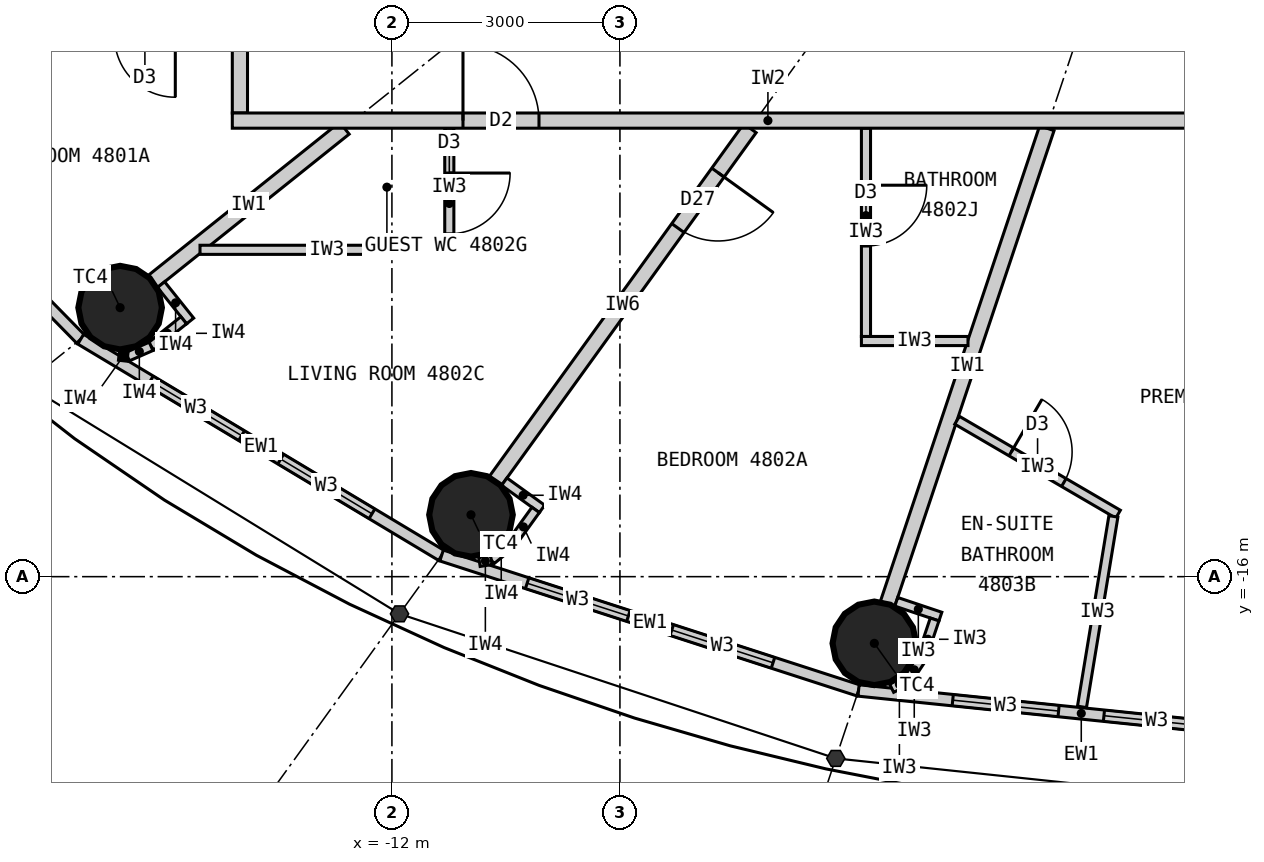
"""IFC4 building model, lengths in metres.
Left out: names, types, materials, properties, quantities, classifications, styles, units other than length and angle.
Written with IfcOpenShell. Run it as: python <this file> out.ifc"""

import sys

from ifc_helpers import new_model, si_unit, direction, frame, frame_2d, origin, origin_2d, place, context, subcontext, project, spatial, rectangle, circle, extrude, element, fill, save


model = new_model("IFC4")
c1 = context("Model", 3, precision=1e-05, world=origin(), true_north=direction((0.0, 1.0)))
c2 = subcontext(c1, "Body", "Model", "MODEL_VIEW")
j1 = project(units=[si_unit("LENGTHUNIT", "METRE"), si_unit("PLANEANGLEUNIT", "RADIAN")], contexts=[c1])
p1 = place(None, origin())
s1 = spatial("IfcSite", under=j1, at=p1, CompositionType="ELEMENT")
p2 = place(p1, origin())
s2 = spatial("IfcBuilding", under=s1, at=p2, CompositionType="ELEMENT")
p3 = place(p2, frame((0.0, 0.0, 179.7)))
s3 = spatial("IfcBuildingStorey", under=s2, at=p3, CompositionType="ELEMENT", Elevation=179.7)
for number, where, z_axis, x_axis in (
    (1, (-15.576, -12.461, 0.0), (0.0, 0.0, 1.0), (1.0, 0.0, 0.0)),
    (2, (-10.96, -15.186, 0.0), (0.0, 0.0, 1.0), (1.0, 0.0, 0.0)),
    (3, (-5.653, -16.877, 0.0), (0.0, 0.0, 1.0), (1.0, 0.0, 0.0)),
):
    element("IfcColumn", number, at=place(p3, frame(where, z_axis=z_axis, x_axis=x_axis)), inside=s3, PredefinedType="COLUMN", context=c2, shape_type="SweptSolid", body=[
        extrude(circle(Radius=0.55, at=origin_2d()), origin(), (0.0, 0.0, 1.0), 3.3),
    ])
p4 = place(p3, frame((-19.772, -9.132, 0.0), z_axis=(0.0, 0.0, 1.0), x_axis=(0.700727467776, -0.71342905457, 0.0)))
e4 = element("IfcWall", 4, at=p4, inside=s3, PredefinedType="ELEMENTEDWALL", context=c2, shape_type="SweptSolid", body=[
    extrude(rectangle(XDim=5.247, YDim=0.15, at=frame_2d((2.624, 0.0))), origin(), (0.0, 0.0, 1.0), 3.12),
])
p5 = place(p4, frame((0.924, 0.0, 0.9)))
e5 = element("IfcOpeningElement", 5, at=p5, cuts=e4, PredefinedType="OPENING", context=c2, shape_type="SweptSolid", body=[
    extrude(rectangle(XDim=1.4, YDim=1.9, at=frame_2d((0.7, 0.95))), frame((0.0, 0.085, 0.0), z_axis=(0.0, -1.0, 0.0), x_axis=(1.0, 0.0, 0.0)), (0.0, 0.0, 1.0), 0.17),
])
p6 = place(p4, frame((2.924, 0.0, 0.9)))
e6 = element("IfcOpeningElement", 6, at=p6, cuts=e4, PredefinedType="OPENING", context=c2, shape_type="SweptSolid", body=[
    extrude(rectangle(XDim=1.4, YDim=1.9, at=frame_2d((0.7, 0.95))), frame((0.0, 0.085, 0.0), z_axis=(0.0, -1.0, 0.0), x_axis=(1.0, 0.0, 0.0)), (0.0, 0.0, 1.0), 0.17),
])
p7 = place(p3, frame((-16.095, -12.876, 0.0), z_axis=(0.0, 0.0, 1.0), x_axis=(0.857695199231, -0.514158482587, 0.0)))
e7 = element("IfcWall", 7, at=p7, inside=s3, PredefinedType="ELEMENTEDWALL", context=c2, shape_type="SweptSolid", body=[
    extrude(rectangle(XDim=5.536, YDim=0.15, at=frame_2d((2.768, 0.0))), origin(), (0.0, 0.0, 1.0), 3.12),
])
p8 = place(p7, frame((1.068, 0.0, 0.9)))
e8 = element("IfcOpeningElement", 8, at=p8, cuts=e7, PredefinedType="OPENING", context=c2, shape_type="SweptSolid", body=[
    extrude(rectangle(XDim=1.4, YDim=1.9, at=frame_2d((0.7, 0.95))), frame((0.0, 0.085, 0.0), z_axis=(0.0, -1.0, 0.0), x_axis=(1.0, 0.0, 0.0)), (0.0, 0.0, 1.0), 0.17),
])
p9 = place(p7, frame((3.068, 0.0, 0.9)))
e9 = element("IfcOpeningElement", 9, at=p9, cuts=e7, PredefinedType="OPENING", context=c2, shape_type="SweptSolid", body=[
    extrude(rectangle(XDim=1.4, YDim=1.9, at=frame_2d((0.7, 0.95))), frame((0.0, 0.085, 0.0), z_axis=(0.0, -1.0, 0.0), x_axis=(1.0, 0.0, 0.0)), (0.0, 0.0, 1.0), 0.17),
])
p10 = place(p3, frame((-11.346, -15.722, 0.0), z_axis=(0.0, 0.0, 1.0), x_axis=(0.951432482129, -0.307857486429, 0.0)))
e10 = element("IfcWall", 10, at=p10, inside=s3, PredefinedType="ELEMENTEDWALL", context=c2, shape_type="SweptSolid", body=[
    extrude(rectangle(XDim=5.766, YDim=0.15, at=frame_2d((2.883, 0.0))), origin(), (0.0, 0.0, 1.0), 3.12),
])
p11 = place(p10, frame((1.183, 0.0, 0.9)))
e11 = element("IfcOpeningElement", 11, at=p11, cuts=e10, PredefinedType="OPENING", context=c2, shape_type="SweptSolid", body=[
    extrude(rectangle(XDim=1.4, YDim=1.9, at=frame_2d((0.7, 0.95))), frame((0.0, 0.085, 0.0), z_axis=(0.0, -1.0, 0.0), x_axis=(1.0, 0.0, 0.0)), (0.0, 0.0, 1.0), 0.17),
])
p12 = place(p10, frame((3.183, 0.0, 0.9)))
e12 = element("IfcOpeningElement", 12, at=p12, cuts=e10, PredefinedType="OPENING", context=c2, shape_type="SweptSolid", body=[
    extrude(rectangle(XDim=1.4, YDim=1.9, at=frame_2d((0.7, 0.95))), frame((0.0, 0.085, 0.0), z_axis=(0.0, -1.0, 0.0), x_axis=(1.0, 0.0, 0.0)), (0.0, 0.0, 1.0), 0.17),
])
p13 = place(p3, frame((-5.86, -17.497, 0.0), z_axis=(0.0, 0.0, 1.0), x_axis=(0.994751738032, -0.102318032045, 0.0)))
e13 = element("IfcWall", 13, at=p13, inside=s3, PredefinedType="ELEMENTEDWALL", context=c2, shape_type="SweptSolid", body=[
    extrude(rectangle(XDim=5.891, YDim=0.15, at=frame_2d((2.946, 0.0))), origin(), (0.0, 0.0, 1.0), 3.12),
])
p14 = place(p13, frame((1.246, 0.0, 0.9)))
e14 = element("IfcOpeningElement", 14, at=p14, cuts=e13, PredefinedType="OPENING", context=c2, shape_type="SweptSolid", body=[
    extrude(rectangle(XDim=1.4, YDim=1.9, at=frame_2d((0.7, 0.95))), frame((0.0, 0.085, 0.0), z_axis=(0.0, -1.0, 0.0), x_axis=(1.0, 0.0, 0.0)), (0.0, 0.0, 1.0), 0.17),
])
p15 = place(p13, frame((3.246, 0.0, 0.9)))
e15 = element("IfcOpeningElement", 15, at=p15, cuts=e13, PredefinedType="OPENING", context=c2, shape_type="SweptSolid", body=[
    extrude(rectangle(XDim=1.4, YDim=1.9, at=frame_2d((0.7, 0.95))), frame((0.0, 0.085, 0.0), z_axis=(0.0, -1.0, 0.0), x_axis=(1.0, 0.0, 0.0)), (0.0, 0.0, 1.0), 0.17),
])
p16 = place(p3, frame((-14.0, 9.9, 0.0), z_axis=(0.0, 0.0, 1.0), x_axis=(0.0, -1.0, 0.0)))
e16 = element("IfcWall", 16, at=p16, inside=s3, PredefinedType="PARTITIONING", context=c2, shape_type="SweptSolid", body=[
    extrude(rectangle(XDim=19.8, YDim=0.2, at=frame_2d((9.9, 0.0))), origin(), (0.0, 0.0, 1.0), 3.12),
])
p17 = place(p16, frame((13.853, 0.0, 0.0)))
e17 = element("IfcOpeningElement", 17, at=p17, cuts=e16, PredefinedType="OPENING", context=c2, shape_type="SweptSolid", body=[
    extrude(rectangle(XDim=1.0, YDim=2.2, at=frame_2d((0.5, 1.1))), frame((0.0, 0.11, 0.0), z_axis=(0.0, -1.0, 0.0), x_axis=(1.0, 0.0, 0.0)), (0.0, 0.0, 1.0), 0.22),
])
p18 = place(p16, frame((1.1, 0.0, 0.0)))
e18 = element("IfcOpeningElement", 18, at=p18, cuts=e16, PredefinedType="OPENING", context=c2, shape_type="SweptSolid", body=[
    extrude(rectangle(XDim=1.0, YDim=2.2, at=frame_2d((0.5, 1.1))), frame((0.0, 0.11, 0.0), z_axis=(0.0, -1.0, 0.0), x_axis=(1.0, 0.0, 0.0)), (0.0, 0.0, 1.0), 0.22),
])
p19 = place(p16, frame((3.688, 0.0, 0.0)))
e19 = element("IfcOpeningElement", 19, at=p19, cuts=e16, PredefinedType="OPENING", context=c2, shape_type="SweptSolid", body=[
    extrude(rectangle(XDim=1.0, YDim=2.2, at=frame_2d((0.5, 1.1))), frame((0.0, 0.11, 0.0), z_axis=(0.0, -1.0, 0.0), x_axis=(1.0, 0.0, 0.0)), (0.0, 0.0, 1.0), 0.22),
])
p20 = place(p16, frame((8.719, 0.0, 0.0)))
e20 = element("IfcOpeningElement", 20, at=p20, cuts=e16, PredefinedType="OPENING", context=c2, shape_type="SweptSolid", body=[
    extrude(rectangle(XDim=1.0, YDim=2.2, at=frame_2d((0.5, 1.1))), frame((0.0, 0.11, 0.0), z_axis=(0.0, -1.0, 0.0), x_axis=(1.0, 0.0, 0.0)), (0.0, 0.0, 1.0), 0.22),
])
p21 = place(p3, frame((-12.625, -10.1, 0.0), z_axis=(0.0, 0.0, 1.0), x_axis=(-0.780876185034, -0.624685827954, 0.0)))
e21 = element("IfcWall", 21, at=p21, inside=s3, PredefinedType="PARTITIONING", context=c2, shape_type="SweptSolid", body=[
    extrude(rectangle(XDim=3.229, YDim=0.2, at=frame_2d((1.615, 0.0))), origin(), (0.0, 0.0, 1.0), 2.27),
])
p22 = place(p3, frame((-7.289, -10.1, 0.0), z_axis=(0.0, 0.0, 1.0), x_axis=(-0.585222595178, -0.810872686735, 0.0)))
e22 = element("IfcWall", 22, at=p22, inside=s3, PredefinedType="PARTITIONING", context=c2, shape_type="SweptSolid", body=[
    extrude(rectangle(XDim=5.722, YDim=0.2, at=frame_2d((2.861, 0.0))), origin(), (0.0, 0.0, 1.0), 2.27),
])
p23 = place(p22, frame((0.72, 0.0, 0.0)))
e23 = element("IfcOpeningElement", 23, at=p23, cuts=e22, PredefinedType="OPENING", context=c2, shape_type="SweptSolid", body=[
    extrude(rectangle(XDim=0.9, YDim=2.1, at=frame_2d((0.45, 1.05))), frame((0.0, 0.11, 0.0), z_axis=(0.0, -1.0, 0.0), x_axis=(1.0, 0.0, 0.0)), (0.0, 0.0, 1.0), 0.22),
])
p24 = place(p3, frame((-3.383, -10.1, 0.0), z_axis=(0.0, 0.0, 1.0), x_axis=(-0.317615120474, -0.948219718866, 0.0)))
e24 = element("IfcWall", 24, at=p24, inside=s3, PredefinedType="PARTITIONING", context=c2, shape_type="SweptSolid", body=[
    extrude(rectangle(XDim=6.597, YDim=0.2, at=frame_2d((3.299, 0.0))), origin(), (0.0, 0.0, 1.0), 2.27),
])
p25 = place(p3, frame((-14.525, -11.7, 0.0), z_axis=(0.0, 0.0, 1.0), x_axis=(1.0, 0.0, 0.0)))
e25 = element("IfcWall", 25, at=p25, inside=s3, PredefinedType="PARTITIONING", context=c2, shape_type="SweptSolid", body=[
    extrude(rectangle(XDim=3.34, YDim=0.12, at=frame_2d((1.67, 0.0))), origin(), (0.0, 0.0, 1.0), 3.12),
])
p26 = place(p3, frame((-11.245, -10.1, 0.0), z_axis=(0.0, 0.0, 1.0), x_axis=(0.0, -1.0, 0.0)))
e26 = element("IfcWall", 26, at=p26, inside=s3, PredefinedType="PARTITIONING", context=c2, shape_type="SweptSolid", body=[
    extrude(rectangle(XDim=1.54, YDim=0.12, at=frame_2d((0.77, 0.0))), origin(), (0.0, 0.0, 1.0), 3.12),
])
p27 = place(p26, frame((0.59, 0.0, 0.0)))
e27 = element("IfcOpeningElement", 27, at=p27, cuts=e26, PredefinedType="OPENING", context=c2, shape_type="SweptSolid", body=[
    extrude(rectangle(XDim=0.8, YDim=2.1, at=frame_2d((0.4, 1.05))), frame((0.0, 0.07, 0.0), z_axis=(0.0, -1.0, 0.0), x_axis=(1.0, 0.0, 0.0)), (0.0, 0.0, 1.0), 0.14),
])
p28 = place(p3, frame((-4.421, -12.9, 0.0), z_axis=(0.0, 0.0, 1.0), x_axis=(-1.0, 0.0, 0.0)))
e28 = element("IfcWall", 28, at=p28, inside=s3, PredefinedType="PARTITIONING", context=c2, shape_type="SweptSolid", body=[
    extrude(rectangle(XDim=1.402, YDim=0.12, at=frame_2d((0.701, 0.0))), origin(), (0.0, 0.0, 1.0), 3.12),
])
p29 = place(p3, frame((-5.763, -10.1, 0.0), z_axis=(0.0, 0.0, 1.0), x_axis=(0.0, -1.0, 0.0)))
e29 = element("IfcWall", 29, at=p29, inside=s3, PredefinedType="PARTITIONING", context=c2, shape_type="SweptSolid", body=[
    extrude(rectangle(XDim=2.74, YDim=0.12, at=frame_2d((1.37, 0.0))), origin(), (0.0, 0.0, 1.0), 3.12),
])
p30 = place(p29, frame((0.75, 0.0, 0.0)))
e30 = element("IfcOpeningElement", 30, at=p30, cuts=e29, PredefinedType="OPENING", context=c2, shape_type="SweptSolid", body=[
    extrude(rectangle(XDim=0.8, YDim=2.1, at=frame_2d((0.4, 1.05))), frame((0.0, 0.07, 0.0), z_axis=(0.0, -1.0, 0.0), x_axis=(1.0, 0.0, 0.0)), (0.0, 0.0, 1.0), 0.14),
])
p31 = place(p3, frame((-4.564, -13.942, 0.0), z_axis=(0.0, 0.0, 1.0), x_axis=(0.863717519451, -0.503976236139, 0.0)))
e31 = element("IfcWall", 31, at=p31, inside=s3, PredefinedType="PARTITIONING", context=c2, shape_type="SweptSolid", body=[
    extrude(rectangle(XDim=2.453, YDim=0.12, at=frame_2d((1.226, 0.0))), origin(), (0.0, 0.0, 1.0), 3.12),
])
p32 = place(p31, frame((0.826, 0.0, 0.0)))
e32 = element("IfcOpeningElement", 32, at=p32, cuts=e31, PredefinedType="OPENING", context=c2, shape_type="SweptSolid", body=[
    extrude(rectangle(XDim=0.8, YDim=2.1, at=frame_2d((0.4, 1.05))), frame((0.0, 0.07, 0.0), z_axis=(0.0, -1.0, 0.0), x_axis=(1.0, 0.0, 0.0)), (0.0, 0.0, 1.0), 0.14),
])
p33 = place(p3, frame((-2.508, -15.207, 0.0), z_axis=(0.0, 0.0, 1.0), x_axis=(-0.162637365963, -0.986685911115, 0.0)))
e33 = element("IfcWall", 33, at=p33, inside=s3, PredefinedType="PARTITIONING", context=c2, shape_type="SweptSolid", body=[
    extrude(rectangle(XDim=2.54, YDim=0.12, at=frame_2d((1.27, 0.0))), origin(), (0.0, 0.0, 1.0), 3.12),
])
p34 = place(p3, frame((-5.364, -16.331, 0.0), z_axis=(0.0, 0.0, 1.0), x_axis=(0.948283770087, -0.317423835572, 0.0)))
e34 = element("IfcWall", 34, at=p34, inside=s3, PredefinedType="PARTITIONING", context=c2, shape_type="SweptSolid", body=[
    extrude(rectangle(XDim=0.612, YDim=0.12, at=frame_2d((0.306, 0.0))), origin(), (0.0, 0.0, 1.0), 3.12),
])
p35 = place(p3, frame((-4.86, -16.563, 0.0), z_axis=(0.0, 0.0, 1.0), x_axis=(-0.317825321803, -0.948149284038, 0.0)))
e35 = element("IfcWall", 35, at=p35, inside=s3, PredefinedType="PARTITIONING", context=c2, shape_type="SweptSolid", body=[
    extrude(rectangle(XDim=0.55, YDim=0.12, at=frame_2d((0.275, 0.0))), origin(), (0.0, 0.0, 1.0), 3.12),
])
p36 = place(p3, frame((-5.034, -17.084, 0.0), z_axis=(0.0, 0.0, 1.0), x_axis=(-0.552362205726, -0.833604218851, 0.0)))
e36 = element("IfcWall", 36, at=p36, inside=s3, PredefinedType="PARTITIONING", context=c2, shape_type="SweptSolid", body=[
    extrude(rectangle(XDim=0.338, YDim=0.12, at=frame_2d((0.169, 0.0))), origin(), (0.0, 0.0, 1.0), 3.12),
])
p37 = place(p3, frame((-5.221, -17.366, 0.0), z_axis=(0.0, 0.0, 1.0), x_axis=(-0.895067896179, -0.445929883759, 0.0)))
e37 = element("IfcWall", 37, at=p37, inside=s3, PredefinedType="PARTITIONING", context=c2, shape_type="SweptSolid", body=[
    extrude(rectangle(XDim=0.228, YDim=0.12, at=frame_2d((0.114, 0.0))), origin(), (0.0, 0.0, 1.0), 3.12),
])
p38 = place(p3, frame((-0.006, -10.0, 0.0), z_axis=(0.0, 0.0, 1.0), x_axis=(-1.0, 0.0, 0.0)))
e38 = element("IfcWall", 38, at=p38, inside=s3, PredefinedType="PARTITIONING", context=c2, shape_type="SweptSolid", body=[
    extrude(rectangle(XDim=14.094, YDim=0.2, at=frame_2d((7.047, 0.0))), origin(), (0.0, 0.0, 1.0), 3.12),
])
p39 = place(p38, frame((10.059, 0.0, 0.0)))
e39 = element("IfcOpeningElement", 39, at=p39, cuts=e38, PredefinedType="OPENING", context=c2, shape_type="SweptSolid", body=[
    extrude(rectangle(XDim=1.0, YDim=2.2, at=frame_2d((0.5, 1.1))), frame((0.0, 0.11, 0.0), z_axis=(0.0, -1.0, 0.0), x_axis=(1.0, 0.0, 0.0)), (0.0, 0.0, 1.0), 0.22),
])
p40 = place(p3, frame((-15.037, -12.158, 0.0), z_axis=(0.0, 0.0, 1.0), x_axis=(0.624840920722, -0.78075208856, 0.0)))
e40 = element("IfcWall", 40, at=p40, inside=s3, PredefinedType="PARTITIONING", context=c2, shape_type="SweptSolid", body=[
    extrude(rectangle(XDim=0.612, YDim=0.12, at=frame_2d((0.306, 0.0))), origin(), (0.0, 0.0, 1.0), 3.12),
])
p41 = place(p3, frame((-14.739, -12.627, 0.0), z_axis=(0.0, 0.0, 1.0), x_axis=(-0.780912119987, -0.624640905527, 0.0)))
e41 = element("IfcWall", 41, at=p41, inside=s3, PredefinedType="PARTITIONING", context=c2, shape_type="SweptSolid", body=[
    extrude(rectangle(XDim=0.55, YDim=0.12, at=frame_2d((0.275, 0.0))), origin(), (0.0, 0.0, 1.0), 3.12),
])
p42 = place(p3, frame((-15.169, -12.97, 0.0), z_axis=(0.0, 0.0, 1.0), x_axis=(-0.915974725257, -0.401235968838, 0.0)))
e42 = element("IfcWall", 42, at=p42, inside=s3, PredefinedType="PARTITIONING", context=c2, shape_type="SweptSolid", body=[
    extrude(rectangle(XDim=0.338, YDim=0.12, at=frame_2d((0.169, 0.0))), origin(), (0.0, 0.0, 1.0), 3.12),
])
p43 = place(p3, frame((-15.478, -13.106, 0.0), z_axis=(0.0, 0.0, 1.0), x_axis=(-0.993778813557, 0.111371763588, 0.0)))
e43 = element("IfcWall", 43, at=p43, inside=s3, PredefinedType="PARTITIONING", context=c2, shape_type="SweptSolid", body=[
    extrude(rectangle(XDim=0.114, YDim=0.12, at=frame_2d((0.057, 0.0))), origin(), (0.0, 0.0, 1.0), 3.12),
])
p44 = place(p3, frame((-10.522, -14.75, 0.0), z_axis=(0.0, 0.0, 1.0), x_axis=(0.811057588427, -0.584966313777, 0.0)))
e44 = element("IfcWall", 44, at=p44, inside=s3, PredefinedType="PARTITIONING", context=c2, shape_type="SweptSolid", body=[
    extrude(rectangle(XDim=0.612, YDim=0.12, at=frame_2d((0.306, 0.0))), origin(), (0.0, 0.0, 1.0), 3.12),
])
p45 = place(p3, frame((-10.109, -15.122, 0.0), z_axis=(0.0, 0.0, 1.0), x_axis=(-0.585344718358, -0.810784534072, 0.0)))
e45 = element("IfcWall", 45, at=p45, inside=s3, PredefinedType="PARTITIONING", context=c2, shape_type="SweptSolid", body=[
    extrude(rectangle(XDim=0.55, YDim=0.12, at=frame_2d((0.275, 0.0))), origin(), (0.0, 0.0, 1.0), 3.12),
])
p46 = place(p3, frame((-10.431, -15.568, 0.0), z_axis=(0.0, 0.0, 1.0), x_axis=(-0.77505137267, -0.631898227345, 0.0)))
e46 = element("IfcWall", 46, at=p46, inside=s3, PredefinedType="PARTITIONING", context=c2, shape_type="SweptSolid", body=[
    extrude(rectangle(XDim=0.338, YDim=0.12, at=frame_2d((0.169, 0.0))), origin(), (0.0, 0.0, 1.0), 3.12),
])
p47 = place(p3, frame((-10.693, -15.781, 0.0), z_axis=(0.0, 0.0, 1.0), x_axis=(-0.987256785332, -0.159135287777, 0.0)))
e47 = element("IfcWall", 47, at=p47, inside=s3, PredefinedType="PARTITIONING", context=c2, shape_type="SweptSolid", body=[
    extrude(rectangle(XDim=0.158, YDim=0.12, at=frame_2d((0.079, 0.0))), origin(), (0.0, 0.0, 1.0), 3.12),
])
p48 = place(p8, origin())
e48 = element("IfcWindow", 48, at=p48, inside=s3, PartitioningType="SINGLE_PANEL", PredefinedType="WINDOW", context=c2, shape_type="SweptSolid", body=[
    extrude(rectangle(XDim=1.4, YDim=1.9, at=frame_2d((0.7, 0.95))), frame((0.0, 0.03, 0.0), z_axis=(0.0, -1.0, 0.0), x_axis=(1.0, 0.0, 0.0)), (0.0, 0.0, 1.0), 0.06),
])
fill(e8, e48)
p49 = place(p9, origin())
e49 = element("IfcWindow", 49, at=p49, inside=s3, PartitioningType="SINGLE_PANEL", PredefinedType="WINDOW", context=c2, shape_type="SweptSolid", body=[
    extrude(rectangle(XDim=1.4, YDim=1.9, at=frame_2d((0.7, 0.95))), frame((0.0, 0.03, 0.0), z_axis=(0.0, -1.0, 0.0), x_axis=(1.0, 0.0, 0.0)), (0.0, 0.0, 1.0), 0.06),
])
fill(e9, e49)
p50 = place(p11, origin())
e50 = element("IfcWindow", 50, at=p50, inside=s3, PartitioningType="SINGLE_PANEL", PredefinedType="WINDOW", context=c2, shape_type="SweptSolid", body=[
    extrude(rectangle(XDim=1.4, YDim=1.9, at=frame_2d((0.7, 0.95))), frame((0.0, 0.03, 0.0), z_axis=(0.0, -1.0, 0.0), x_axis=(1.0, 0.0, 0.0)), (0.0, 0.0, 1.0), 0.06),
])
fill(e11, e50)
p51 = place(p12, origin())
e51 = element("IfcWindow", 51, at=p51, inside=s3, PartitioningType="SINGLE_PANEL", PredefinedType="WINDOW", context=c2, shape_type="SweptSolid", body=[
    extrude(rectangle(XDim=1.4, YDim=1.9, at=frame_2d((0.7, 0.95))), frame((0.0, 0.03, 0.0), z_axis=(0.0, -1.0, 0.0), x_axis=(1.0, 0.0, 0.0)), (0.0, 0.0, 1.0), 0.06),
])
fill(e12, e51)
p52 = place(p14, origin())
e52 = element("IfcWindow", 52, at=p52, inside=s3, PartitioningType="SINGLE_PANEL", PredefinedType="WINDOW", context=c2, shape_type="SweptSolid", body=[
    extrude(rectangle(XDim=1.4, YDim=1.9, at=frame_2d((0.7, 0.95))), frame((0.0, 0.03, 0.0), z_axis=(0.0, -1.0, 0.0), x_axis=(1.0, 0.0, 0.0)), (0.0, 0.0, 1.0), 0.06),
])
fill(e14, e52)
p53 = place(p15, origin())
e53 = element("IfcWindow", 53, at=p53, inside=s3, PartitioningType="SINGLE_PANEL", PredefinedType="WINDOW", context=c2, shape_type="SweptSolid", body=[
    extrude(rectangle(XDim=1.4, YDim=1.9, at=frame_2d((0.7, 0.95))), frame((0.0, 0.03, 0.0), z_axis=(0.0, -1.0, 0.0), x_axis=(1.0, 0.0, 0.0)), (0.0, 0.0, 1.0), 0.06),
])
fill(e15, e53)
p54 = place(p27, origin())
e54 = element("IfcDoor", 54, at=p54, inside=s3, OperationType="SINGLE_SWING_LEFT", PredefinedType="DOOR", context=c2, shape_type="SweptSolid", body=[
    extrude(rectangle(XDim=0.8, YDim=2.1, at=frame_2d((0.4, 1.05))), frame((0.0, 0.025, 0.0), z_axis=(0.0, -1.0, 0.0), x_axis=(1.0, 0.0, 0.0)), (0.0, 0.0, 1.0), 0.05),
])
fill(e27, e54)
p55 = place(p39, origin())
e55 = element("IfcDoor", 55, at=p55, inside=s3, OperationType="SINGLE_SWING_RIGHT", PredefinedType="DOOR", context=c2, shape_type="SweptSolid", body=[
    extrude(rectangle(XDim=1.0, YDim=2.2, at=frame_2d((0.5, 1.1))), frame((0.0, 0.025, 0.0), z_axis=(0.0, -1.0, 0.0), x_axis=(1.0, 0.0, 0.0)), (0.0, 0.0, 1.0), 0.05),
])
fill(e39, e55)
p56 = place(p30, origin())
e56 = element("IfcDoor", 56, at=p56, inside=s3, OperationType="SINGLE_SWING_LEFT", PredefinedType="DOOR", context=c2, shape_type="SweptSolid", body=[
    extrude(rectangle(XDim=0.8, YDim=2.1, at=frame_2d((0.4, 1.05))), frame((0.0, 0.025, 0.0), z_axis=(0.0, -1.0, 0.0), x_axis=(1.0, 0.0, 0.0)), (0.0, 0.0, 1.0), 0.05),
])
fill(e30, e56)
p57 = place(p23, origin())
e57 = element("IfcDoor", 57, at=p57, inside=s3, OperationType="SINGLE_SWING_LEFT", PredefinedType="DOOR", context=c2, shape_type="SweptSolid", body=[
    extrude(rectangle(XDim=0.9, YDim=2.1, at=frame_2d((0.45, 1.05))), frame((0.0, 0.025, 0.0), z_axis=(0.0, -1.0, 0.0), x_axis=(1.0, 0.0, 0.0)), (0.0, 0.0, 1.0), 0.05),
])
fill(e23, e57)
p58 = place(p32, origin())
e58 = element("IfcDoor", 58, at=p58, inside=s3, OperationType="SINGLE_SWING_LEFT", PredefinedType="DOOR", context=c2, shape_type="SweptSolid", body=[
    extrude(rectangle(XDim=0.8, YDim=2.1, at=frame_2d((0.4, 1.05))), frame((0.0, 0.025, 0.0), z_axis=(0.0, -1.0, 0.0), x_axis=(1.0, 0.0, 0.0)), (0.0, 0.0, 1.0), 0.05),
])
fill(e32, e58)
save(model, sys.argv[1])
